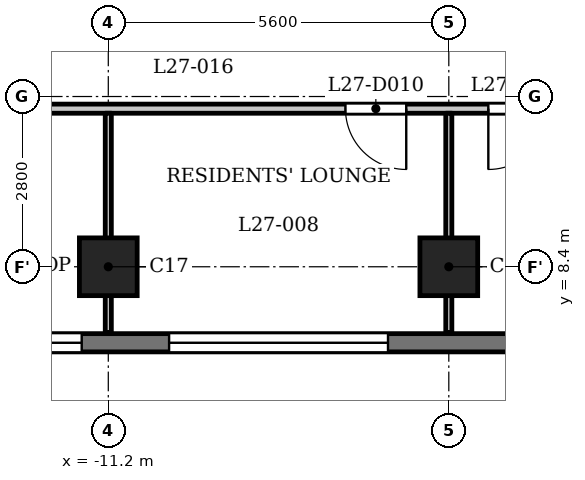
"""IFC4 building model, lengths in metres.
Left out: names, types, materials, properties, quantities, classifications, styles, units other than length and angle.
Written with IfcOpenShell. Run it as: python <this file> out.ifc"""

import sys

from ifc_helpers import new_model, si_unit, direction, frame, frame_2d, origin, origin_2d, place, context, subcontext, project, spatial, rectangle, extrude, element, fill, save


model = new_model("IFC4")
c1 = context("Model", 3, precision=1e-05, world=origin(), true_north=direction((0.0, 1.0)))
c2 = subcontext(c1, "Body", "Model", "MODEL_VIEW")
j1 = project(units=[si_unit("LENGTHUNIT", "METRE"), si_unit("PLANEANGLEUNIT", "RADIAN")], contexts=[c1])
p1 = place(None, origin())
s1 = spatial("IfcSite", under=j1, at=p1, CompositionType="ELEMENT")
p2 = place(p1, origin())
s2 = spatial("IfcBuilding", under=s1, at=p2, CompositionType="ELEMENT")
p3 = place(p2, frame((0.0, 0.0, 107.8)))
s3 = spatial("IfcBuildingStorey", under=s2, at=p3, CompositionType="ELEMENT", Elevation=107.8)
for number, where, z_axis, x_axis in (
    (1, (-11.2, 8.4, 0.0), (0.0, 0.0, 1.0), (1.0, 0.0, 0.0)),
    (2, (-5.6, 8.4, 0.0), (0.0, 0.0, 1.0), (1.0, 0.0, 0.0)),
):
    element("IfcColumn", number, at=place(p3, frame(where, z_axis=z_axis, x_axis=x_axis)), inside=s3, PredefinedType="COLUMN", context=c2, shape_type="SweptSolid", body=[
        extrude(rectangle(XDim=0.95, YDim=0.95, at=origin_2d()), origin(), (0.0, 0.0, 1.0), 3.5),
    ])
p4 = place(p3, frame((-13.8, 7.15, 0.0), z_axis=(0.0, 0.0, 1.0), x_axis=(1.0, 0.0, 0.0)))
e3 = element("IfcWall", 3, at=p4, inside=s3, PredefinedType="SOLIDWALL", context=c2, shape_type="SweptSolid", body=[
    extrude(rectangle(XDim=27.6, YDim=0.3, at=frame_2d((13.8, 0.0))), origin(), (0.0, 0.0, 1.0), 3.2),
])
p5 = place(p4, frame((0.363, 0.0, 0.9)))
e4 = element("IfcOpeningElement", 4, at=p5, cuts=e3, PredefinedType="OPENING", context=c2, shape_type="SweptSolid", body=[
    extrude(rectangle(XDim=1.8, YDim=1.25, at=frame_2d((0.9, 0.625))), frame((0.0, 0.16, 0.0), z_axis=(0.0, -1.0, 0.0), x_axis=(1.0, 0.0, 0.0)), (0.0, 0.0, 1.0), 0.32),
])
p6 = place(p4, frame((3.6, 0.0, 1.2)))
e5 = element("IfcOpeningElement", 5, at=p6, cuts=e3, PredefinedType="OPENING", context=c2, shape_type="SweptSolid", body=[
    extrude(rectangle(XDim=3.6, YDim=0.95, at=frame_2d((1.8, 0.475))), frame((0.0, 0.16, 0.0), z_axis=(0.0, -1.0, 0.0), x_axis=(1.0, 0.0, 0.0)), (0.0, 0.0, 1.0), 0.32),
])
p7 = place(p4, frame((9.2, 0.0, 1.2)))
e6 = element("IfcOpeningElement", 6, at=p7, cuts=e3, PredefinedType="OPENING", context=c2, shape_type="SweptSolid", body=[
    extrude(rectangle(XDim=3.6, YDim=0.95, at=frame_2d((1.8, 0.475))), frame((0.0, 0.16, 0.0), z_axis=(0.0, -1.0, 0.0), x_axis=(1.0, 0.0, 0.0)), (0.0, 0.0, 1.0), 0.32),
])
p8 = place(p4, frame((14.8, 0.0, 1.2)))
e7 = element("IfcOpeningElement", 7, at=p8, cuts=e3, PredefinedType="OPENING", context=c2, shape_type="SweptSolid", body=[
    extrude(rectangle(XDim=3.6, YDim=0.95, at=frame_2d((1.8, 0.475))), frame((0.0, 0.16, 0.0), z_axis=(0.0, -1.0, 0.0), x_axis=(1.0, 0.0, 0.0)), (0.0, 0.0, 1.0), 0.32),
])
p9 = place(p4, frame((20.4, 0.0, 1.2)))
e8 = element("IfcOpeningElement", 8, at=p9, cuts=e3, PredefinedType="OPENING", context=c2, shape_type="SweptSolid", body=[
    extrude(rectangle(XDim=3.6, YDim=0.95, at=frame_2d((1.8, 0.475))), frame((0.0, 0.16, 0.0), z_axis=(0.0, -1.0, 0.0), x_axis=(1.0, 0.0, 0.0)), (0.0, 0.0, 1.0), 0.32),
])
p10 = place(p4, frame((25.438, 0.0, 0.9)))
e9 = element("IfcOpeningElement", 9, at=p10, cuts=e3, PredefinedType="OPENING", context=c2, shape_type="SweptSolid", body=[
    extrude(rectangle(XDim=1.8, YDim=1.25, at=frame_2d((0.9, 0.625))), frame((0.0, 0.16, 0.0), z_axis=(0.0, -1.0, 0.0), x_axis=(1.0, 0.0, 0.0)), (0.0, 0.0, 1.0), 0.32),
])
p11 = place(p3, frame((-14.925, 11.0, 0.0), z_axis=(0.0, 0.0, 1.0), x_axis=(1.0, 0.0, 0.0)))
e10 = element("IfcWall", 10, at=p11, inside=s3, PredefinedType="PARTITIONING", context=c2, shape_type="SweptSolid", body=[
    extrude(rectangle(XDim=29.85, YDim=0.15, at=frame_2d((14.925, 0.0))), origin(), (0.0, 0.0, 1.0), 3.2),
])
p12 = place(p11, frame((1.076, 0.0, 0.0)))
e11 = element("IfcOpeningElement", 11, at=p12, cuts=e10, PredefinedType="OPENING", context=c2, shape_type="SweptSolid", body=[
    extrude(rectangle(XDim=1.0, YDim=2.1, at=frame_2d((0.5, 1.05))), frame((0.0, 0.085, 0.0), z_axis=(0.0, -1.0, 0.0), x_axis=(1.0, 0.0, 0.0)), (0.0, 0.0, 1.0), 0.17),
])
p13 = place(p11, frame((7.625, 0.0, 0.0)))
e12 = element("IfcOpeningElement", 12, at=p13, cuts=e10, PredefinedType="OPENING", context=c2, shape_type="SweptSolid", body=[
    extrude(rectangle(XDim=1.0, YDim=2.1, at=frame_2d((0.5, 1.05))), frame((0.0, 0.085, 0.0), z_axis=(0.0, -1.0, 0.0), x_axis=(1.0, 0.0, 0.0)), (0.0, 0.0, 1.0), 0.17),
])
p14 = place(p11, frame((9.975, 0.0, 0.0)))
e13 = element("IfcOpeningElement", 13, at=p14, cuts=e10, PredefinedType="OPENING", context=c2, shape_type="SweptSolid", body=[
    extrude(rectangle(XDim=1.0, YDim=2.1, at=frame_2d((0.5, 1.05))), frame((0.0, 0.085, 0.0), z_axis=(0.0, -1.0, 0.0), x_axis=(1.0, 0.0, 0.0)), (0.0, 0.0, 1.0), 0.17),
])
p15 = place(p11, frame((18.825, 0.0, 0.0)))
e14 = element("IfcOpeningElement", 14, at=p15, cuts=e10, PredefinedType="OPENING", context=c2, shape_type="SweptSolid", body=[
    extrude(rectangle(XDim=1.0, YDim=2.1, at=frame_2d((0.5, 1.05))), frame((0.0, 0.085, 0.0), z_axis=(0.0, -1.0, 0.0), x_axis=(1.0, 0.0, 0.0)), (0.0, 0.0, 1.0), 0.17),
])
p16 = place(p11, frame((21.175, 0.0, 0.0)))
e15 = element("IfcOpeningElement", 15, at=p16, cuts=e10, PredefinedType="OPENING", context=c2, shape_type="SweptSolid", body=[
    extrude(rectangle(XDim=1.0, YDim=2.1, at=frame_2d((0.5, 1.05))), frame((0.0, 0.085, 0.0), z_axis=(0.0, -1.0, 0.0), x_axis=(1.0, 0.0, 0.0)), (0.0, 0.0, 1.0), 0.17),
])
p17 = place(p11, frame((27.775, 0.0, 0.0)))
e16 = element("IfcOpeningElement", 16, at=p17, cuts=e10, PredefinedType="OPENING", context=c2, shape_type="SweptSolid", body=[
    extrude(rectangle(XDim=1.0, YDim=2.1, at=frame_2d((0.5, 1.05))), frame((0.0, 0.085, 0.0), z_axis=(0.0, -1.0, 0.0), x_axis=(1.0, 0.0, 0.0)), (0.0, 0.0, 1.0), 0.17),
])
for number, where, z_axis, x_axis in (
    (17, (-11.2, 7.32, 0.0), (0.0, 0.0, 1.0), (0.0, 1.0, 0.0)),
    (18, (-5.6, 7.32, 0.0), (0.0, 0.0, 1.0), (0.0, 1.0, 0.0)),
):
    element("IfcWall", number, at=place(p3, frame(where, z_axis=z_axis, x_axis=x_axis)), inside=s3, PredefinedType="PARTITIONING", context=c2, shape_type="SweptSolid", body=[
        extrude(rectangle(XDim=3.605, YDim=0.1, at=frame_2d((1.802, 0.0))), origin(), (0.0, 0.0, 1.0), 3.2),
    ])
p18 = place(p13, origin())
e19 = element("IfcDoor", 19, at=p18, inside=s3, OperationType="SINGLE_SWING_RIGHT", PredefinedType="DOOR", context=c2, shape_type="SweptSolid", body=[
    extrude(rectangle(XDim=1.0, YDim=2.1, at=frame_2d((0.5, 1.05))), frame((0.0, 0.025, 0.0), z_axis=(0.0, -1.0, 0.0), x_axis=(1.0, 0.0, 0.0)), (0.0, 0.0, 1.0), 0.05),
])
fill(e12, e19)
p19 = place(p14, origin())
e20 = element("IfcDoor", 20, at=p19, inside=s3, OperationType="SINGLE_SWING_LEFT", PredefinedType="DOOR", context=c2, shape_type="SweptSolid", body=[
    extrude(rectangle(XDim=1.0, YDim=2.1, at=frame_2d((0.5, 1.05))), frame((0.0, 0.025, 0.0), z_axis=(0.0, -1.0, 0.0), x_axis=(1.0, 0.0, 0.0)), (0.0, 0.0, 1.0), 0.05),
])
fill(e13, e20)
p20 = place(p5, origin())
e21 = element("IfcWindow", 21, at=p20, inside=s3, PartitioningType="SINGLE_PANEL", PredefinedType="WINDOW", context=c2, shape_type="SweptSolid", body=[
    extrude(rectangle(XDim=1.8, YDim=1.25, at=frame_2d((0.9, 0.625))), frame((0.0, 0.03, 0.0), z_axis=(0.0, -1.0, 0.0), x_axis=(1.0, 0.0, 0.0)), (0.0, 0.0, 1.0), 0.06),
])
fill(e4, e21)
p21 = place(p6, origin())
e22 = element("IfcWindow", 22, at=p21, inside=s3, PartitioningType="SINGLE_PANEL", PredefinedType="WINDOW", context=c2, shape_type="SweptSolid", body=[
    extrude(rectangle(XDim=3.6, YDim=0.95, at=frame_2d((1.8, 0.475))), frame((0.0, 0.03, 0.0), z_axis=(0.0, -1.0, 0.0), x_axis=(1.0, 0.0, 0.0)), (0.0, 0.0, 1.0), 0.06),
])
fill(e5, e22)
save(model, sys.argv[1])
